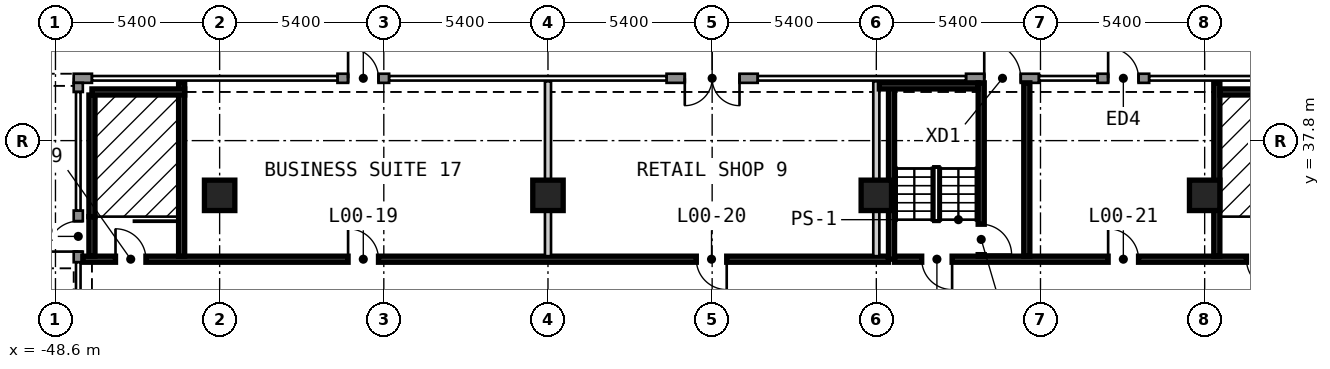
"""IFC4 building model, lengths in metres.
Left out: names, types, materials, properties, quantities, classifications, styles, units other than length and angle.
Written with IfcOpenShell. Run it as: python <this file> out.ifc"""

import sys

from ifc_helpers import new_model, si_unit, direction, frame, frame_2d, origin, origin_2d, place, context, subcontext, project, spatial, rectangle, extrude, element, fill, save


model = new_model("IFC4")
c1 = context("Model", 3, precision=1e-05, world=origin(), true_north=direction((0.0, 1.0)))
c2 = subcontext(c1, "Body", "Model", "MODEL_VIEW")
j1 = project(units=[si_unit("LENGTHUNIT", "METRE"), si_unit("PLANEANGLEUNIT", "RADIAN")], contexts=[c1])
p1 = place(None, origin())
s1 = spatial("IfcSite", under=j1, at=p1, CompositionType="ELEMENT")
p2 = place(p1, origin())
s2 = spatial("IfcBuilding", under=s1, at=p2, CompositionType="ELEMENT")
p3 = place(p2, origin())
s3 = spatial("IfcBuildingStorey", under=s2, at=p3, CompositionType="ELEMENT", Elevation=0.0)
for number, where, z_axis, x_axis in (
    (1, (-43.2, 36.0, 0.0), (0.0, 0.0, 1.0), (1.0, 0.0, 0.0)),
    (2, (-32.4, 36.0, 0.0), (0.0, 0.0, 1.0), (1.0, 0.0, 0.0)),
    (3, (-21.6, 36.0, 0.0), (0.0, 0.0, 1.0), (1.0, 0.0, 0.0)),
    (4, (-10.8, 36.0, 0.0), (0.0, 0.0, 1.0), (1.0, 0.0, 0.0)),
):
    element("IfcColumn", number, at=place(p3, frame(where, z_axis=z_axis, x_axis=x_axis)), inside=s3, PredefinedType="COLUMN", context=c2, shape_type="SweptSolid", body=[
        extrude(rectangle(XDim=1.0, YDim=1.0, at=origin_2d()), origin(), (0.0, 0.0, 1.0), 5.0),
    ])
p4 = place(p3, frame((-12.625, 39.85, 0.0), z_axis=(0.0, 0.0, 1.0), x_axis=(-1.0, 0.0, 0.0)))
e5 = element("IfcWall", 5, at=p4, inside=s3, PredefinedType="SOLIDWALL", context=c2, shape_type="SweptSolid", body=[
    extrude(rectangle(XDim=1.7, YDim=0.3, at=frame_2d((0.85, 0.0))), origin(), (0.0, 0.0, 1.0), 4.55),
])
p5 = place(p4, frame((1.35, 0.0, 0.0), z_axis=(0.0, 0.0, 1.0), x_axis=(-1.0, 0.0, 0.0)))
e6 = element("IfcOpeningElement", 6, at=p5, cuts=e5, PredefinedType="OPENING", context=c2, shape_type="SweptSolid", body=[
    extrude(rectangle(XDim=1.0, YDim=2.4, at=frame_2d((0.5, 1.2))), frame((0.0, 0.16, 0.0), z_axis=(0.0, -1.0, 0.0), x_axis=(1.0, 0.0, 0.0)), (0.0, 0.0, 1.0), 0.32),
])
p6 = place(p3, frame((-16.25, 39.85, 0.0), z_axis=(0.0, 0.0, 1.0), x_axis=(-1.0, 0.0, 0.0)))
e7 = element("IfcWall", 7, at=p6, inside=s3, PredefinedType="SOLIDWALL", context=c2, shape_type="SweptSolid", body=[
    extrude(rectangle(XDim=2.4, YDim=0.3, at=frame_2d((1.2, 0.0))), origin(), (0.0, 0.0, 1.0), 4.55),
])
p7 = place(p6, frame((1.8, 0.0, 0.0), z_axis=(0.0, 0.0, 1.0), x_axis=(-1.0, 0.0, 0.0)))
e8 = element("IfcOpeningElement", 8, at=p7, cuts=e7, PredefinedType="OPENING", context=c2, shape_type="SweptSolid", body=[
    extrude(rectangle(XDim=1.2, YDim=2.4, at=frame_2d((0.6, 1.2))), frame((0.0, 0.16, 0.0), z_axis=(0.0, -1.0, 0.0), x_axis=(1.0, 0.0, 0.0)), (0.0, 0.0, 1.0), 0.32),
])
p8 = place(p3, frame((-25.5, 39.85, 0.0), z_axis=(0.0, 0.0, 1.0), x_axis=(-1.0, 0.0, 0.0)))
e9 = element("IfcWall", 9, at=p8, inside=s3, PredefinedType="SOLIDWALL", context=c2, shape_type="SweptSolid", body=[
    extrude(rectangle(XDim=3.0, YDim=0.3, at=frame_2d((1.5, 0.0))), origin(), (0.0, 0.0, 1.0), 4.55),
])
p9 = place(p8, frame((2.4, 0.0, 0.0), z_axis=(0.0, 0.0, 1.0), x_axis=(-1.0, 0.0, 0.0)))
e10 = element("IfcOpeningElement", 10, at=p9, cuts=e9, PredefinedType="OPENING", context=c2, shape_type="SweptSolid", body=[
    extrude(rectangle(XDim=1.8, YDim=2.4, at=frame_2d((0.9, 1.2))), frame((0.0, 0.16, 0.0), z_axis=(0.0, -1.0, 0.0), x_axis=(1.0, 0.0, 0.0)), (0.0, 0.0, 1.0), 0.32),
])
p10 = place(p3, frame((-37.625, 39.85, 0.0), z_axis=(0.0, 0.0, 1.0), x_axis=(-1.0, 0.0, 0.0)))
e11 = element("IfcWall", 11, at=p10, inside=s3, PredefinedType="SOLIDWALL", context=c2, shape_type="SweptSolid", body=[
    extrude(rectangle(XDim=1.7, YDim=0.3, at=frame_2d((0.85, 0.0))), origin(), (0.0, 0.0, 1.0), 4.55),
])
p11 = place(p10, frame((1.35, 0.0, 0.0), z_axis=(0.0, 0.0, 1.0), x_axis=(-1.0, 0.0, 0.0)))
e12 = element("IfcOpeningElement", 12, at=p11, cuts=e11, PredefinedType="OPENING", context=c2, shape_type="SweptSolid", body=[
    extrude(rectangle(XDim=1.0, YDim=2.4, at=frame_2d((0.5, 1.2))), frame((0.0, 0.16, 0.0), z_axis=(0.0, -1.0, 0.0), x_axis=(1.0, 0.0, 0.0)), (0.0, 0.0, 1.0), 0.32),
])
p12 = place(p3, frame((-47.4, 39.85, 0.0), z_axis=(0.0, 0.0, 1.0), x_axis=(-1.0, 0.0, 0.0)))
e13 = element("IfcWall", 13, at=p12, inside=s3, PredefinedType="SOLIDWALL", context=c2, shape_type="SweptSolid", body=[
    extrude(rectangle(XDim=0.6, YDim=0.3, at=frame_2d((0.3, 0.0))), origin(), (0.0, 0.0, 1.0), 4.55),
])
p13 = place(p3, frame((-47.85, 39.7, 0.0), z_axis=(0.0, 0.0, 1.0), x_axis=(0.0, -1.0, 0.0)))
e14 = element("IfcWall", 14, at=p13, inside=s3, PredefinedType="SOLIDWALL", context=c2, shape_type="SweptSolid", body=[
    extrude(rectangle(XDim=0.3, YDim=0.3, at=frame_2d((0.15, 0.0))), origin(), (0.0, 0.0, 1.0), 4.55),
])
p14 = place(p3, frame((-47.85, 35.5, 0.0), z_axis=(0.0, 0.0, 1.0), x_axis=(0.0, -1.0, 0.0)))
e15 = element("IfcWall", 15, at=p14, inside=s3, PredefinedType="SOLIDWALL", context=c2, shape_type="SweptSolid", body=[
    extrude(rectangle(XDim=1.7, YDim=0.3, at=frame_2d((0.85, 0.0))), origin(), (0.0, 0.0, 1.0), 4.55),
])
p15 = place(p14, frame((1.35, 0.0, 0.0), z_axis=(0.0, 0.0, 1.0), x_axis=(-1.0, 0.0, 0.0)))
e16 = element("IfcOpeningElement", 16, at=p15, cuts=e15, PredefinedType="OPENING", context=c2, shape_type="SweptSolid", body=[
    extrude(rectangle(XDim=1.0, YDim=2.4, at=frame_2d((0.5, 1.2))), frame((0.0, 0.16, 0.0), z_axis=(0.0, -1.0, 0.0), x_axis=(1.0, 0.0, 0.0)), (0.0, 0.0, 1.0), 0.32),
])
p16 = place(p3, frame((-47.7, 33.9, 0.0), z_axis=(0.0, 0.0, 1.0), x_axis=(1.0, 0.0, 0.0)))
e17 = element("IfcWall", 17, at=p16, inside=s3, PredefinedType="SOLIDWALL", context=c2, shape_type="SweptSolid", body=[
    extrude(rectangle(XDim=26.5, YDim=0.2, at=frame_2d((13.25, 0.0))), origin(), (0.0, 0.0, 1.0), 4.55),
])
p17 = place(p16, frame((8.725, 0.0, 0.0)))
e18 = element("IfcOpeningElement", 18, at=p17, cuts=e17, PredefinedType="OPENING", context=c2, shape_type="SweptSolid", body=[
    extrude(rectangle(XDim=1.0, YDim=2.1, at=frame_2d((0.5, 1.05))), frame((0.0, 0.11, 0.0), z_axis=(0.0, -1.0, 0.0), x_axis=(1.0, 0.0, 0.0)), (0.0, 0.0, 1.0), 0.22),
])
p18 = place(p16, frame((20.179, 0.0, 0.0)))
e19 = element("IfcOpeningElement", 19, at=p18, cuts=e17, PredefinedType="OPENING", context=c2, shape_type="SweptSolid", body=[
    extrude(rectangle(XDim=1.0, YDim=2.1, at=frame_2d((0.5, 1.05))), frame((0.0, 0.11, 0.0), z_axis=(0.0, -1.0, 0.0), x_axis=(1.0, 0.0, 0.0)), (0.0, 0.0, 1.0), 0.22),
])
p19 = place(p16, frame((1.075, 0.0, 0.0)))
e20 = element("IfcOpeningElement", 20, at=p19, cuts=e17, PredefinedType="OPENING", context=c2, shape_type="SweptSolid", body=[
    extrude(rectangle(XDim=1.0, YDim=2.1, at=frame_2d((0.5, 1.05))), frame((0.0, 0.11, 0.0), z_axis=(0.0, -1.0, 0.0), x_axis=(1.0, 0.0, 0.0)), (0.0, 0.0, 1.0), 0.22),
])
p20 = place(p3, frame((-21.0, 33.9, 0.0), z_axis=(0.0, 0.0, 1.0), x_axis=(1.0, 0.0, 0.0)))
e21 = element("IfcWall", 21, at=p20, inside=s3, PredefinedType="SOLIDWALL", context=c2, shape_type="SweptSolid", body=[
    extrude(rectangle(XDim=18.9, YDim=0.2, at=frame_2d((9.45, 0.0))), origin(), (0.0, 0.0, 1.0), 4.55),
])
p21 = place(p20, frame((7.025, 0.0, 0.0)))
e22 = element("IfcOpeningElement", 22, at=p21, cuts=e21, PredefinedType="OPENING", context=c2, shape_type="SweptSolid", body=[
    extrude(rectangle(XDim=1.0, YDim=2.1, at=frame_2d((0.5, 1.05))), frame((0.0, 0.11, 0.0), z_axis=(0.0, -1.0, 0.0), x_axis=(1.0, 0.0, 0.0)), (0.0, 0.0, 1.0), 0.22),
])
p22 = place(p20, frame((16.523, 0.0, 0.0)))
e23 = element("IfcOpeningElement", 23, at=p22, cuts=e21, PredefinedType="OPENING", context=c2, shape_type="SweptSolid", body=[
    extrude(rectangle(XDim=1.0, YDim=2.1, at=frame_2d((0.5, 1.05))), frame((0.0, 0.11, 0.0), z_axis=(0.0, -1.0, 0.0), x_axis=(1.0, 0.0, 0.0)), (0.0, 0.0, 1.0), 0.22),
])
p23 = place(p20, frame((0.893, 0.0, 0.0)))
e24 = element("IfcOpeningElement", 24, at=p23, cuts=e21, PredefinedType="OPENING", context=c2, shape_type="SweptSolid", body=[
    extrude(rectangle(XDim=1.0, YDim=2.1, at=frame_2d((0.5, 1.05))), frame((0.0, 0.11, 0.0), z_axis=(0.0, -1.0, 0.0), x_axis=(1.0, 0.0, 0.0)), (0.0, 0.0, 1.0), 0.22),
])
p24 = place(p20, frame((11.575, 0.0, 0.0)))
e25 = element("IfcOpeningElement", 25, at=p24, cuts=e21, PredefinedType="OPENING", context=c2, shape_type="SweptSolid", body=[
    extrude(rectangle(XDim=1.0, YDim=2.1, at=frame_2d((0.5, 1.05))), frame((0.0, 0.11, 0.0), z_axis=(0.0, -1.0, 0.0), x_axis=(1.0, 0.0, 0.0)), (0.0, 0.0, 1.0), 0.22),
])
p25 = place(p3, frame((-44.45, 34.0, 0.0), z_axis=(0.0, 0.0, 1.0), x_axis=(0.0, 1.0, 0.0)))
e26 = element("IfcWall", 26, at=p25, inside=s3, PredefinedType="SOLIDWALL", context=c2, shape_type="SweptSolid", body=[
    extrude(rectangle(XDim=5.7, YDim=0.2, at=frame_2d((2.85, 0.0))), origin(), (0.0, 0.0, 1.0), 4.55),
])
for number, where, z_axis, x_axis in (
    (27, (-32.4, 34.0, 0.0), (0.0, 0.0, 1.0), (0.0, 1.0, 0.0)),
    (28, (-21.6, 34.0, 0.0), (0.0, 0.0, 1.0), (0.0, 1.0, 0.0)),
):
    element("IfcWall", number, at=place(p3, frame(where, z_axis=z_axis, x_axis=x_axis)), inside=s3, PredefinedType="PARTITIONING", context=c2, shape_type="SweptSolid", body=[
        extrude(rectangle(XDim=5.75, YDim=0.2, at=frame_2d((2.875, 0.0))), origin(), (0.0, 0.0, 1.0), 4.55),
    ])
p26 = place(p3, frame((-21.1, 33.9, 0.0), z_axis=(0.0, 0.0, 1.0), x_axis=(0.0, 1.0, 0.0)))
e29 = element("IfcWall", 29, at=p26, inside=s3, PredefinedType="SOLIDWALL", context=c2, shape_type="SweptSolid", body=[
    extrude(rectangle(XDim=5.8, YDim=0.2, at=frame_2d((2.9, 0.0))), origin(), (0.0, 0.0, 1.0), 4.55),
])
p27 = place(p3, frame((-18.15, 34.0, 0.0), z_axis=(0.0, 0.0, 1.0), x_axis=(0.0, 1.0, 0.0)))
e30 = element("IfcWall", 30, at=p27, inside=s3, PredefinedType="SOLIDWALL", context=c2, shape_type="SweptSolid", body=[
    extrude(rectangle(XDim=5.7, YDim=0.2, at=frame_2d((2.85, 0.0))), origin(), (0.0, 0.0, 1.0), 4.55),
])
p28 = place(p27, frame((1.05, 0.0, 0.0), z_axis=(0.0, 0.0, 1.0), x_axis=(-1.0, 0.0, 0.0)))
e31 = element("IfcOpeningElement", 31, at=p28, cuts=e30, PredefinedType="OPENING", context=c2, shape_type="SweptSolid", body=[
    extrude(rectangle(XDim=1.0, YDim=2.1, at=frame_2d((0.5, 1.05))), frame((0.0, 0.11, 0.0), z_axis=(0.0, -1.0, 0.0), x_axis=(1.0, 0.0, 0.0)), (0.0, 0.0, 1.0), 0.22),
])
for number, where, z_axis, x_axis in (
    (32, (-16.65, 34.0, 0.0), (0.0, 0.0, 1.0), (0.0, 1.0, 0.0)),
    (33, (-10.4, 34.0, 0.0), (0.0, 0.0, 1.0), (0.0, 1.0, 0.0)),
):
    element("IfcWall", number, at=place(p3, frame(where, z_axis=z_axis, x_axis=x_axis)), inside=s3, PredefinedType="SOLIDWALL", context=c2, shape_type="SweptSolid", body=[
        extrude(rectangle(XDim=5.7, YDim=0.2, at=frame_2d((2.85, 0.0))), origin(), (0.0, 0.0, 1.0), 4.55),
    ])
p29 = place(p3, frame((-47.4, 35.3, 0.0), z_axis=(0.0, 0.0, 1.0), x_axis=(0.0, 1.0, 0.0)))
e34 = element("IfcWall", 34, at=p29, inside=s3, PredefinedType="SOLIDWALL", context=c2, shape_type="SweptSolid", body=[
    extrude(rectangle(XDim=4.0, YDim=0.2, at=frame_2d((2.0, 0.0))), origin(), (0.0, 0.0, 1.0), 4.55),
])
p30 = place(p3, frame((-47.4, 34.0, 2.3), z_axis=(0.0, 0.0, 1.0), x_axis=(0.0, 1.0, 0.0)))
e35 = element("IfcWall", 35, at=p30, inside=s3, PredefinedType="SOLIDWALL", context=c2, shape_type="SweptSolid", body=[
    extrude(rectangle(XDim=1.3, YDim=0.2, at=frame_2d((0.65, 0.0))), origin(), (0.0, 0.0, 1.0), 2.25),
])
p31 = place(p3, frame((-47.4, 39.4, 0.0), z_axis=(0.0, 0.0, 1.0), x_axis=(1.0, 0.0, 0.0)))
e36 = element("IfcWall", 36, at=p31, inside=s3, PredefinedType="SOLIDWALL", context=c2, shape_type="SweptSolid", body=[
    extrude(rectangle(XDim=3.05, YDim=0.2, at=frame_2d((1.525, 0.0))), origin(), (0.0, 0.0, 1.0), 4.55),
])
p32 = place(p3, frame((-10.3, 39.4, 0.0), z_axis=(0.0, 0.0, 1.0), x_axis=(1.0, 0.0, 0.0)))
e37 = element("IfcWall", 37, at=p32, inside=s3, PredefinedType="SOLIDWALL", context=c2, shape_type="SweptSolid", body=[
    extrude(rectangle(XDim=2.75, YDim=0.2, at=frame_2d((1.375, 0.0))), origin(), (0.0, 0.0, 1.0), 4.55),
])
p33 = place(p3, frame((-21.5, 39.6, 0.0), z_axis=(0.0, 0.0, 1.0), x_axis=(1.0, 0.0, 0.0)))
e38 = element("IfcWall", 38, at=p33, inside=s3, PredefinedType="SOLIDWALL", context=c2, shape_type="SweptSolid", body=[
    extrude(rectangle(XDim=3.25, YDim=0.2, at=frame_2d((1.625, 0.0))), origin(), (0.0, 0.0, 1.0), 4.55),
])
p34 = place(p5, origin())
e39 = element("IfcDoor", 39, at=p34, inside=s3, OperationType="SINGLE_SWING_RIGHT", PredefinedType="DOOR", context=c2, shape_type="SweptSolid", body=[
    extrude(rectangle(XDim=1.0, YDim=2.4, at=frame_2d((0.5, 1.2))), frame((0.0, 0.025, 0.0), z_axis=(0.0, -1.0, 0.0), x_axis=(1.0, 0.0, 0.0)), (0.0, 0.0, 1.0), 0.05),
])
fill(e6, e39)
p35 = place(p7, origin())
e40 = element("IfcDoor", 40, at=p35, inside=s3, OperationType="SINGLE_SWING_RIGHT", PredefinedType="DOOR", context=c2, shape_type="SweptSolid", body=[
    extrude(rectangle(XDim=1.2, YDim=2.4, at=frame_2d((0.6, 1.2))), frame((0.0, 0.025, 0.0), z_axis=(0.0, -1.0, 0.0), x_axis=(1.0, 0.0, 0.0)), (0.0, 0.0, 1.0), 0.05),
])
fill(e8, e40)
p36 = place(p9, origin())
e41 = element("IfcDoor", 41, at=p36, inside=s3, OperationType="DOUBLE_DOOR_DOUBLE_SWING", PredefinedType="DOOR", context=c2, shape_type="SweptSolid", body=[
    extrude(rectangle(XDim=1.8, YDim=2.4, at=frame_2d((0.9, 1.2))), frame((0.0, 0.025, 0.0), z_axis=(0.0, -1.0, 0.0), x_axis=(1.0, 0.0, 0.0)), (0.0, 0.0, 1.0), 0.05),
])
fill(e10, e41)
p37 = place(p11, origin())
e42 = element("IfcDoor", 42, at=p37, inside=s3, OperationType="SINGLE_SWING_RIGHT", PredefinedType="DOOR", context=c2, shape_type="SweptSolid", body=[
    extrude(rectangle(XDim=1.0, YDim=2.4, at=frame_2d((0.5, 1.2))), frame((0.0, 0.025, 0.0), z_axis=(0.0, -1.0, 0.0), x_axis=(1.0, 0.0, 0.0)), (0.0, 0.0, 1.0), 0.05),
])
fill(e12, e42)
p38 = place(p15, origin())
e43 = element("IfcDoor", 43, at=p38, inside=s3, OperationType="SINGLE_SWING_RIGHT", PredefinedType="DOOR", context=c2, shape_type="SweptSolid", body=[
    extrude(rectangle(XDim=1.0, YDim=2.4, at=frame_2d((0.5, 1.2))), frame((0.0, 0.025, 0.0), z_axis=(0.0, -1.0, 0.0), x_axis=(1.0, 0.0, 0.0)), (0.0, 0.0, 1.0), 0.05),
])
fill(e16, e43)
p39 = place(p17, origin())
e44 = element("IfcDoor", 44, at=p39, inside=s3, OperationType="SINGLE_SWING_LEFT", PredefinedType="DOOR", context=c2, shape_type="SweptSolid", body=[
    extrude(rectangle(XDim=1.0, YDim=2.1, at=frame_2d((0.5, 1.05))), frame((0.0, 0.025, 0.0), z_axis=(0.0, -1.0, 0.0), x_axis=(1.0, 0.0, 0.0)), (0.0, 0.0, 1.0), 0.05),
])
fill(e18, e44)
p40 = place(p18, origin())
e45 = element("IfcDoor", 45, at=p40, inside=s3, OperationType="SINGLE_SWING_RIGHT", PredefinedType="DOOR", context=c2, shape_type="SweptSolid", body=[
    extrude(rectangle(XDim=1.0, YDim=2.1, at=frame_2d((0.5, 1.05))), frame((0.0, 0.025, 0.0), z_axis=(0.0, -1.0, 0.0), x_axis=(1.0, 0.0, 0.0)), (0.0, 0.0, 1.0), 0.05),
])
fill(e19, e45)
p41 = place(p21, origin())
e46 = element("IfcDoor", 46, at=p41, inside=s3, OperationType="SINGLE_SWING_LEFT", PredefinedType="DOOR", context=c2, shape_type="SweptSolid", body=[
    extrude(rectangle(XDim=1.0, YDim=2.1, at=frame_2d((0.5, 1.05))), frame((0.0, 0.025, 0.0), z_axis=(0.0, -1.0, 0.0), x_axis=(1.0, 0.0, 0.0)), (0.0, 0.0, 1.0), 0.05),
])
fill(e22, e46)
p42 = place(p19, origin())
e47 = element("IfcDoor", 47, at=p42, inside=s3, OperationType="SINGLE_SWING_LEFT", PredefinedType="DOOR", context=c2, shape_type="SweptSolid", body=[
    extrude(rectangle(XDim=1.0, YDim=2.1, at=frame_2d((0.5, 1.05))), frame((0.0, 0.025, 0.0), z_axis=(0.0, -1.0, 0.0), x_axis=(1.0, 0.0, 0.0)), (0.0, 0.0, 1.0), 0.05),
])
fill(e20, e47)
p43 = place(p23, origin())
e48 = element("IfcDoor", 48, at=p43, inside=s3, OperationType="SINGLE_SWING_RIGHT", PredefinedType="DOOR", context=c2, shape_type="SweptSolid", body=[
    extrude(rectangle(XDim=1.0, YDim=2.1, at=frame_2d((0.5, 1.05))), frame((0.0, 0.025, 0.0), z_axis=(0.0, -1.0, 0.0), x_axis=(1.0, 0.0, 0.0)), (0.0, 0.0, 1.0), 0.05),
])
fill(e24, e48)
p44 = place(p24, origin())
e49 = element("IfcDoor", 49, at=p44, inside=s3, OperationType="SINGLE_SWING_RIGHT", PredefinedType="DOOR", context=c2, shape_type="SweptSolid", body=[
    extrude(rectangle(XDim=1.0, YDim=2.1, at=frame_2d((0.5, 1.05))), frame((0.0, 0.025, 0.0), z_axis=(0.0, -1.0, 0.0), x_axis=(1.0, 0.0, 0.0)), (0.0, 0.0, 1.0), 0.05),
])
fill(e25, e49)
p45 = place(p28, origin())
e50 = element("IfcDoor", 50, at=p45, inside=s3, OperationType="SINGLE_SWING_RIGHT", PredefinedType="DOOR", context=c2, shape_type="SweptSolid", body=[
    extrude(rectangle(XDim=1.0, YDim=2.1, at=frame_2d((0.5, 1.05))), frame((0.0, 0.025, 0.0), z_axis=(0.0, -1.0, 0.0), x_axis=(1.0, 0.0, 0.0)), (0.0, 0.0, 1.0), 0.05),
])
fill(e31, e50)
save(model, sys.argv[1])
